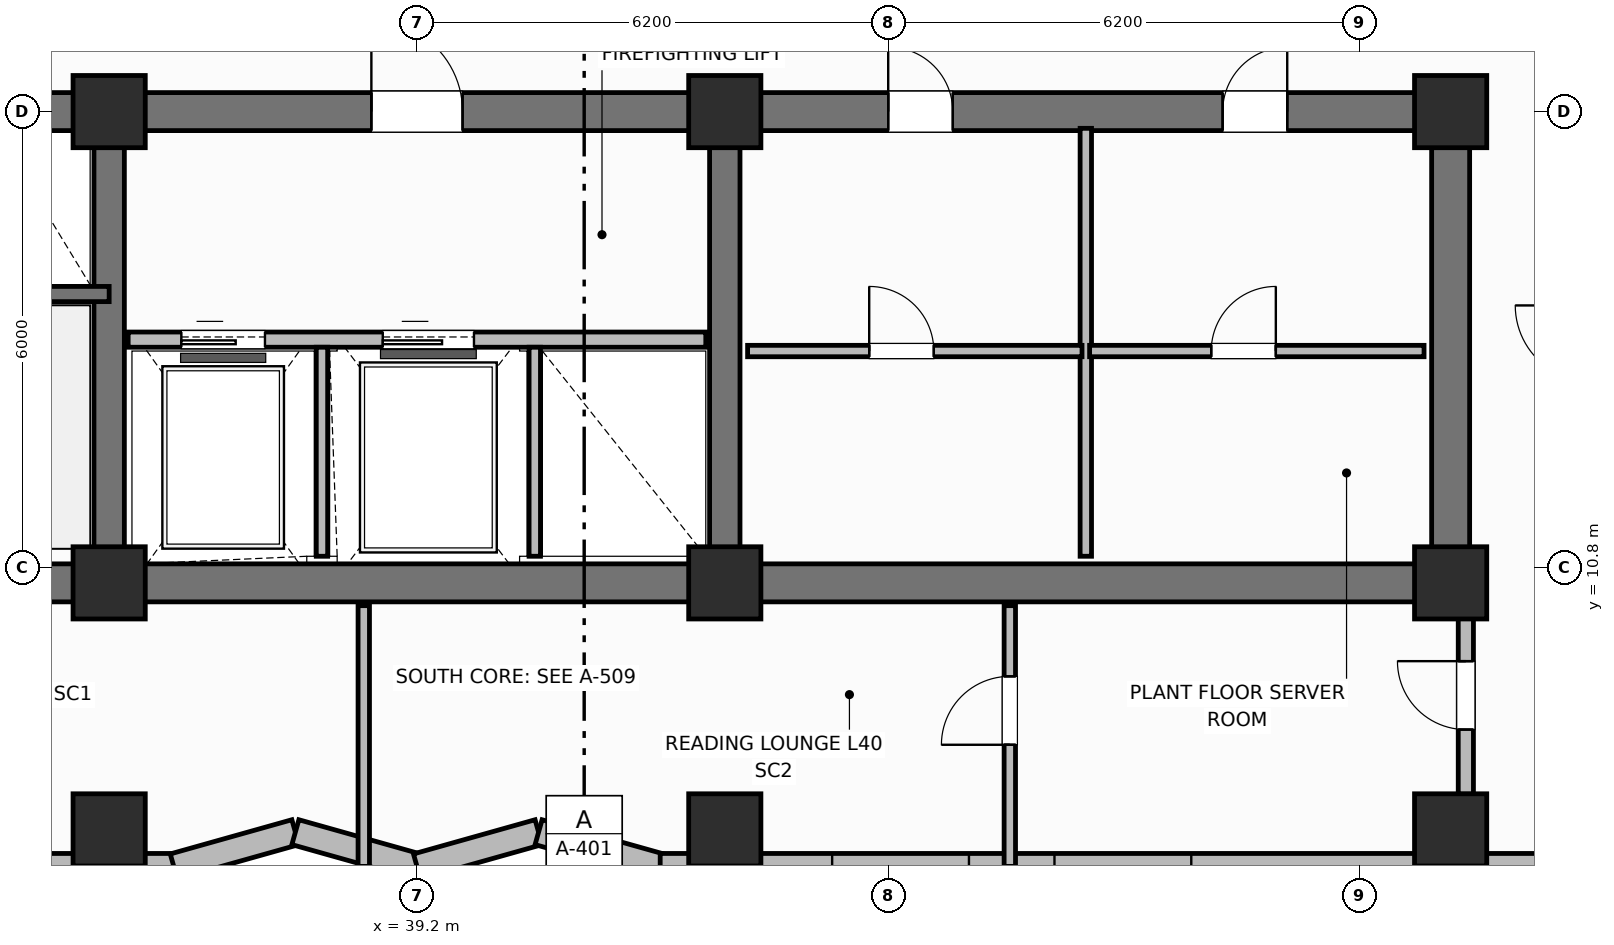
"""IFC4 building model, lengths in metres.
Left out: names, types, materials, properties, quantities, classifications, styles, units other than length and angle.
Written with IfcOpenShell. Run it as: python <this file> out.ifc"""

import sys

from ifc_helpers import new_model, si_unit, direction, frame, frame_2d, origin, origin_2d, place, context, subcontext, project, spatial, rectangle, extrude, element, fill, save


model = new_model("IFC4")
c1 = context("Model", 3, precision=1e-05, world=origin(), true_north=direction((0.0, 1.0)))
c2 = subcontext(c1, "Body", "Model", "MODEL_VIEW")
j1 = project(units=[si_unit("LENGTHUNIT", "METRE"), si_unit("PLANEANGLEUNIT", "RADIAN")], contexts=[c1])
p1 = place(None, origin())
s1 = spatial("IfcSite", under=j1, at=p1, CompositionType="ELEMENT")
p2 = place(p1, origin())
s2 = spatial("IfcBuilding", under=s1, at=p2, CompositionType="ELEMENT")
p3 = place(p2, frame((0.0, 0.0, 162.6)))
s3 = spatial("IfcBuildingStorey", under=s2, at=p3, CompositionType="ELEMENT", Elevation=162.6)
p4 = place(p3, frame((52.8, 10.6, 0.0), z_axis=(0.0, 0.0, 1.0), x_axis=(-1.0, 0.0, 0.0)))
e1 = element("IfcWall", 1, at=p4, inside=s3, PredefinedType="SHEAR", context=c2, shape_type="SweptSolid", body=[
    extrude(rectangle(XDim=27.2, YDim=0.5, at=frame_2d((13.6, 0.0))), origin(), (0.0, 0.0, 1.0), 3.7),
])
p5 = place(p3, frame((52.8, 10.85, 0.0), z_axis=(0.0, 0.0, 1.0), x_axis=(0.0, 1.0, 0.0)))
e2 = element("IfcWall", 2, at=p5, inside=s3, PredefinedType="SHEAR", context=c2, shape_type="SweptSolid", body=[
    extrude(rectangle(XDim=5.7, YDim=0.5, at=frame_2d((2.85, 0.0))), origin(), (0.0, 0.0, 1.0), 3.7),
])
p6 = place(p3, frame((25.6, 16.8, 0.0), z_axis=(0.0, 0.0, 1.0), x_axis=(1.0, 0.0, 0.0)))
e3 = element("IfcWall", 3, at=p6, inside=s3, PredefinedType="SHEAR", context=c2, shape_type="SweptSolid", body=[
    extrude(rectangle(XDim=27.2, YDim=0.5, at=frame_2d((13.6, 0.0))), origin(), (0.0, 0.0, 1.0), 3.7),
])
p7 = place(p6, frame((1.7, 0.0, 0.0)))
e4 = element("IfcOpeningElement", 4, at=p7, cuts=e3, PredefinedType="OPENING", context=c2, shape_type="SweptSolid", body=[
    extrude(rectangle(XDim=1.1, YDim=2.15, at=frame_2d((0.55, 1.075))), frame((0.0, 0.26, 0.0), z_axis=(0.0, -1.0, 0.0), x_axis=(1.0, 0.0, 0.0)), (0.0, 0.0, 1.0), 0.52),
])
p8 = place(p6, frame((4.45, 0.0, 0.0)))
e5 = element("IfcOpeningElement", 5, at=p8, cuts=e3, PredefinedType="OPENING", context=c2, shape_type="SweptSolid", body=[
    extrude(rectangle(XDim=0.85, YDim=2.1, at=frame_2d((0.425, 1.05))), frame((0.0, 0.26, 0.0), z_axis=(0.0, -1.0, 0.0), x_axis=(1.0, 0.0, 0.0)), (0.0, 0.0, 1.0), 0.52),
])
p9 = place(p6, frame((6.5, 0.0, 0.0)))
e6 = element("IfcOpeningElement", 6, at=p9, cuts=e3, PredefinedType="OPENING", context=c2, shape_type="SweptSolid", body=[
    extrude(rectangle(XDim=0.85, YDim=2.1, at=frame_2d((0.425, 1.05))), frame((0.0, 0.26, 0.0), z_axis=(0.0, -1.0, 0.0), x_axis=(1.0, 0.0, 0.0)), (0.0, 0.0, 1.0), 0.52),
])
p10 = place(p6, frame((13.0, 0.0, 0.0)))
e7 = element("IfcOpeningElement", 7, at=p10, cuts=e3, PredefinedType="OPENING", context=c2, shape_type="SweptSolid", body=[
    extrude(rectangle(XDim=1.2, YDim=2.15, at=frame_2d((0.6, 1.075))), frame((0.0, 0.26, 0.0), z_axis=(0.0, -1.0, 0.0), x_axis=(1.0, 0.0, 0.0)), (0.0, 0.0, 1.0), 0.52),
])
p11 = place(p6, frame((19.8, 0.0, 0.0)))
e8 = element("IfcOpeningElement", 8, at=p11, cuts=e3, PredefinedType="OPENING", context=c2, shape_type="SweptSolid", body=[
    extrude(rectangle(XDim=0.85, YDim=2.1, at=frame_2d((0.425, 1.05))), frame((0.0, 0.26, 0.0), z_axis=(0.0, -1.0, 0.0), x_axis=(1.0, 0.0, 0.0)), (0.0, 0.0, 1.0), 0.52),
])
p12 = place(p6, frame((24.2, 0.0, 0.0)))
e9 = element("IfcOpeningElement", 9, at=p12, cuts=e3, PredefinedType="OPENING", context=c2, shape_type="SweptSolid", body=[
    extrude(rectangle(XDim=0.85, YDim=2.1, at=frame_2d((0.425, 1.05))), frame((0.0, 0.26, 0.0), z_axis=(0.0, -1.0, 0.0), x_axis=(1.0, 0.0, 0.0)), (0.0, 0.0, 1.0), 0.52),
])
for number, where, z_axis, x_axis in (
    (10, (35.15, 10.85, 0.0), (0.0, 0.0, 1.0), (0.0, 1.0, 0.0)),
    (11, (43.25, 10.85, 0.0), (0.0, 0.0, 1.0), (0.0, 1.0, 0.0)),
):
    element("IfcWall", number, at=place(p3, frame(where, z_axis=z_axis, x_axis=x_axis)), inside=s3, PredefinedType="SHEAR", context=c2, shape_type="SweptSolid", body=[
        extrude(rectangle(XDim=5.7, YDim=0.4, at=frame_2d((2.85, 0.0))), origin(), (0.0, 0.0, 1.0), 3.7),
    ])
for number, where, z_axis, x_axis in (
    (12, (35.15, 10.6, 0.0), (0.0, 0.0, 1.0), (1.0, 0.0, 0.0)),
    (13, (35.15, 16.8, 0.0), (0.0, 0.0, 1.0), (1.0, 0.0, 0.0)),
    (14, (43.25, 10.6, 0.0), (0.0, 0.0, 1.0), (1.0, 0.0, 0.0)),
    (15, (43.25, 16.8, 0.0), (0.0, 0.0, 1.0), (1.0, 0.0, 0.0)),
    (16, (52.8, 10.6, 0.0), (0.0, 0.0, 1.0), (1.0, 0.0, 0.0)),
    (17, (52.8, 16.8, 0.0), (0.0, 0.0, 1.0), (1.0, 0.0, 0.0)),
    (18, (35.15, 7.35, 0.0), (0.0, 0.0, 1.0), (1.0, 0.0, 0.0)),
    (19, (43.25, 7.35, 0.0), (0.0, 0.0, 1.0), (1.0, 0.0, 0.0)),
    (20, (52.8, 7.35, 0.0), (0.0, 0.0, 1.0), (1.0, 0.0, 0.0)),
):
    element("IfcColumn", number, at=place(p3, frame(where, z_axis=z_axis, x_axis=x_axis)), inside=s3, PredefinedType="COLUMN", context=c2, shape_type="SweptSolid", body=[
        extrude(rectangle(XDim=0.95, YDim=0.95, at=origin_2d()), origin(), (0.0, 0.0, 1.0), 3.7),
    ])
p13 = place(p3, frame((20.2, 6.87, 0.0), z_axis=(0.0, 0.0, 1.0), x_axis=(1.0, 0.0, 0.0)))
e21 = element("IfcWall", 21, at=p13, inside=s3, PredefinedType="SOLIDWALL", context=c2, shape_type="SweptSolid", body=[
    extrude(rectangle(XDim=15.8, YDim=0.34, at=frame_2d((7.9, 0.0))), origin(), (0.0, 0.0, 1.0), 2.72),
])
p14 = place(p13, frame((0.863, 0.0, 0.75)))
e22 = element("IfcOpeningElement", 22, at=p14, cuts=e21, PredefinedType="OPENING", context=c2, shape_type="SweptSolid", body=[
    extrude(rectangle(XDim=1.8, YDim=1.85, at=frame_2d((0.9, 0.925))), frame((0.0, 0.18, 0.0), z_axis=(0.0, -1.0, 0.0), x_axis=(1.0, 0.0, 0.0)), (0.0, 0.0, 1.0), 0.36),
])
p15 = place(p13, frame((8.113, 0.0, 0.75)))
e23 = element("IfcOpeningElement", 23, at=p15, cuts=e21, PredefinedType="OPENING", context=c2, shape_type="SweptSolid", body=[
    extrude(rectangle(XDim=1.8, YDim=1.85, at=frame_2d((0.9, 0.925))), frame((0.0, 0.18, 0.0), z_axis=(0.0, -1.0, 0.0), x_axis=(1.0, 0.0, 0.0)), (0.0, 0.0, 1.0), 0.36),
])
p16 = place(p13, frame((11.738, 0.0, 0.75)))
e24 = element("IfcOpeningElement", 24, at=p16, cuts=e21, PredefinedType="OPENING", context=c2, shape_type="SweptSolid", body=[
    extrude(rectangle(XDim=1.8, YDim=1.85, at=frame_2d((0.9, 0.925))), frame((0.0, 0.18, 0.0), z_axis=(0.0, -1.0, 0.0), x_axis=(1.0, 0.0, 0.0)), (0.0, 0.0, 1.0), 0.36),
])
p17 = place(p3, frame((36.0, 6.87, 0.0), z_axis=(0.0, 0.0, 1.0), x_axis=(0.962662902433, 0.270703040766, 0.0)))
e25 = element("IfcWall", 25, at=p17, inside=s3, PredefinedType="SOLIDWALL", context=c2, shape_type="SweptSolid", body=[
    extrude(rectangle(XDim=1.662, YDim=0.34, at=frame_2d((0.831, 0.0))), origin(), (0.0, 0.0, 1.0), 2.72),
])
p18 = place(p3, frame((37.6, 7.32, 0.0), z_axis=(0.0, 0.0, 1.0), x_axis=(0.962652136636, -0.270741322725, 0.0)))
e26 = element("IfcWall", 26, at=p18, inside=s3, PredefinedType="SOLIDWALL", context=c2, shape_type="SweptSolid", body=[
    extrude(rectangle(XDim=1.662, YDim=0.34, at=frame_2d((0.831, 0.0))), origin(), (0.0, 0.0, 1.0), 2.72),
])
p19 = place(p3, frame((39.2, 6.87, 0.0), z_axis=(0.0, 0.0, 1.0), x_axis=(0.962662902433, 0.270703040766, 0.0)))
e27 = element("IfcWall", 27, at=p19, inside=s3, PredefinedType="SOLIDWALL", context=c2, shape_type="SweptSolid", body=[
    extrude(rectangle(XDim=1.662, YDim=0.34, at=frame_2d((0.831, 0.0))), origin(), (0.0, 0.0, 1.0), 2.72),
])
p20 = place(p3, frame((40.8, 7.32, 0.0), z_axis=(0.0, 0.0, 1.0), x_axis=(0.962652136636, -0.270741322725, 0.0)))
e28 = element("IfcWall", 28, at=p20, inside=s3, PredefinedType="SOLIDWALL", context=c2, shape_type="SweptSolid", body=[
    extrude(rectangle(XDim=1.662, YDim=0.34, at=frame_2d((0.831, 0.0))), origin(), (0.0, 0.0, 1.0), 2.72),
])
p21 = place(p3, frame((42.4, 6.87, 0.0), z_axis=(0.0, 0.0, 1.0), x_axis=(1.0, 0.0, 0.0)))
e29 = element("IfcWall", 29, at=p21, inside=s3, PredefinedType="SOLIDWALL", context=c2, shape_type="SweptSolid", body=[
    extrude(rectangle(XDim=15.8, YDim=0.34, at=frame_2d((7.9, 0.0))), origin(), (0.0, 0.0, 1.0), 2.72),
])
p22 = place(p21, frame((2.262, 0.0, 0.75)))
e30 = element("IfcOpeningElement", 30, at=p22, cuts=e29, PredefinedType="OPENING", context=c2, shape_type="SweptSolid", body=[
    extrude(rectangle(XDim=1.8, YDim=1.85, at=frame_2d((0.9, 0.925))), frame((0.0, 0.18, 0.0), z_axis=(0.0, -1.0, 0.0), x_axis=(1.0, 0.0, 0.0)), (0.0, 0.0, 1.0), 0.36),
])
p23 = place(p21, frame((5.188, 0.0, 0.75)))
e31 = element("IfcOpeningElement", 31, at=p23, cuts=e29, PredefinedType="OPENING", context=c2, shape_type="SweptSolid", body=[
    extrude(rectangle(XDim=1.8, YDim=1.85, at=frame_2d((0.9, 0.925))), frame((0.0, 0.18, 0.0), z_axis=(0.0, -1.0, 0.0), x_axis=(1.0, 0.0, 0.0)), (0.0, 0.0, 1.0), 0.36),
])
p24 = place(p21, frame((12.788, 0.0, 0.75)))
e32 = element("IfcOpeningElement", 32, at=p24, cuts=e29, PredefinedType="OPENING", context=c2, shape_type="SweptSolid", body=[
    extrude(rectangle(XDim=1.8, YDim=1.85, at=frame_2d((0.9, 0.925))), frame((0.0, 0.18, 0.0), z_axis=(0.0, -1.0, 0.0), x_axis=(1.0, 0.0, 0.0)), (0.0, 0.0, 1.0), 0.36),
])
p25 = place(p3, frame((25.6, 14.4, 0.0), z_axis=(0.0, 0.0, 1.0), x_axis=(1.0, 0.0, 0.0)))
e33 = element("IfcWall", 33, at=p25, inside=s3, PredefinedType="SHEAR", context=c2, shape_type="SweptSolid", body=[
    extrude(rectangle(XDim=9.55, YDim=0.2, at=frame_2d((4.775, 0.0))), origin(), (0.0, 0.0, 1.0), 3.7),
])
p26 = place(p25, frame((1.05, 0.0, 0.0)))
e34 = element("IfcOpeningElement", 34, at=p26, cuts=e33, PredefinedType="OPENING", context=c2, shape_type="SweptSolid", body=[
    extrude(rectangle(XDim=1.1, YDim=2.15, at=frame_2d((0.55, 1.075))), frame((0.0, 0.11, 0.0), z_axis=(0.0, -1.0, 0.0), x_axis=(1.0, 0.0, 0.0)), (0.0, 0.0, 1.0), 0.22),
])
p27 = place(p3, frame((35.4, 13.8, 0.0), z_axis=(0.0, 0.0, 1.0), x_axis=(1.0, 0.0, 0.0)))
e35 = element("IfcWall", 35, at=p27, inside=s3, PredefinedType="PARTITIONING", context=c2, shape_type="SweptSolid", body=[
    extrude(rectangle(XDim=7.6, YDim=0.2, at=frame_2d((3.8, 0.0))), origin(), (0.0, 0.0, 1.0), 2.32),
])
p28 = place(p27, frame((0.7, 0.0, 0.0)))
e36 = element("IfcOpeningElement", 36, at=p28, cuts=e35, PredefinedType="OPENING", context=c2, shape_type="SweptSolid", body=[
    extrude(rectangle(XDim=1.1, YDim=2.15, at=frame_2d((0.55, 1.075))), frame((0.0, 0.11, 0.0), z_axis=(0.0, -1.0, 0.0), x_axis=(1.0, 0.0, 0.0)), (0.0, 0.0, 1.0), 0.22),
])
p29 = place(p27, frame((3.35, 0.0, 0.0)))
e37 = element("IfcOpeningElement", 37, at=p29, cuts=e35, PredefinedType="OPENING", context=c2, shape_type="SweptSolid", body=[
    extrude(rectangle(XDim=1.2, YDim=2.15, at=frame_2d((0.6, 1.075))), frame((0.0, 0.11, 0.0), z_axis=(0.0, -1.0, 0.0), x_axis=(1.0, 0.0, 0.0)), (0.0, 0.0, 1.0), 0.22),
])
for number, where, z_axis, x_axis in (
    (38, (37.95, 10.95, 0.0), (0.0, 0.0, 1.0), (0.0, 1.0, 0.0)),
    (39, (40.75, 10.95, 0.0), (0.0, 0.0, 1.0), (0.0, 1.0, 0.0)),
):
    element("IfcWall", number, at=place(p3, frame(where, z_axis=z_axis, x_axis=x_axis)), inside=s3, PredefinedType="PARTITIONING", context=c2, shape_type="SweptSolid", body=[
        extrude(rectangle(XDim=2.75, YDim=0.15, at=frame_2d((1.375, 0.0))), origin(), (0.0, 0.0, 1.0), 2.55),
    ])
p30 = place(p3, frame((48.0, 10.95, 0.0), z_axis=(0.0, 0.0, 1.0), x_axis=(0.0, 1.0, 0.0)))
e40 = element("IfcWall", 40, at=p30, inside=s3, PredefinedType="PARTITIONING", context=c2, shape_type="SweptSolid", body=[
    extrude(rectangle(XDim=5.63, YDim=0.15, at=frame_2d((2.815, 0.0))), origin(), (0.0, 0.0, 1.0), 2.55),
])
p31 = place(p3, frame((43.55, 13.65, 0.0), z_axis=(0.0, 0.0, 1.0), x_axis=(1.0, 0.0, 0.0)))
e41 = element("IfcWall", 41, at=p31, inside=s3, PredefinedType="PARTITIONING", context=c2, shape_type="SweptSolid", body=[
    extrude(rectangle(XDim=4.4, YDim=0.15, at=frame_2d((2.2, 0.0))), origin(), (0.0, 0.0, 1.0), 2.55),
])
p32 = place(p31, frame((1.6, 0.0, 0.0)))
e42 = element("IfcOpeningElement", 42, at=p32, cuts=e41, PredefinedType="OPENING", context=c2, shape_type="SweptSolid", body=[
    extrude(rectangle(XDim=0.85, YDim=2.1, at=frame_2d((0.425, 1.05))), frame((0.0, 0.085, 0.0), z_axis=(0.0, -1.0, 0.0), x_axis=(1.0, 0.0, 0.0)), (0.0, 0.0, 1.0), 0.17),
])
p33 = place(p3, frame((48.05, 13.65, 0.0), z_axis=(0.0, 0.0, 1.0), x_axis=(1.0, 0.0, 0.0)))
e43 = element("IfcWall", 43, at=p33, inside=s3, PredefinedType="PARTITIONING", context=c2, shape_type="SweptSolid", body=[
    extrude(rectangle(XDim=4.4, YDim=0.15, at=frame_2d((2.2, 0.0))), origin(), (0.0, 0.0, 1.0), 2.55),
])
p34 = place(p33, frame((1.6, 0.0, 0.0)))
e44 = element("IfcOpeningElement", 44, at=p34, cuts=e43, PredefinedType="OPENING", context=c2, shape_type="SweptSolid", body=[
    extrude(rectangle(XDim=0.85, YDim=2.1, at=frame_2d((0.425, 1.05))), frame((0.0, 0.085, 0.0), z_axis=(0.0, -1.0, 0.0), x_axis=(1.0, 0.0, 0.0)), (0.0, 0.0, 1.0), 0.17),
])
p35 = place(p3, frame((38.5, 6.87, 0.0), z_axis=(0.0, 0.0, 1.0), x_axis=(0.0, 1.0, 0.0)))
e45 = element("IfcWall", 45, at=p35, inside=s3, PredefinedType="PARTITIONING", context=c2, shape_type="SweptSolid", body=[
    extrude(rectangle(XDim=3.43, YDim=0.15, at=frame_2d((1.715, 0.0))), origin(), (0.0, 0.0, 1.0), 2.55),
])
p36 = place(p3, frame((47.0, 6.87, 0.0), z_axis=(0.0, 0.0, 1.0), x_axis=(0.0, 1.0, 0.0)))
e46 = element("IfcWall", 46, at=p36, inside=s3, PredefinedType="PARTITIONING", context=c2, shape_type="SweptSolid", body=[
    extrude(rectangle(XDim=3.43, YDim=0.15, at=frame_2d((1.715, 0.0))), origin(), (0.0, 0.0, 1.0), 2.55),
])
p37 = place(p36, frame((1.6, 0.0, 0.0)))
e47 = element("IfcOpeningElement", 47, at=p37, cuts=e46, PredefinedType="OPENING", context=c2, shape_type="SweptSolid", body=[
    extrude(rectangle(XDim=0.9, YDim=2.1, at=frame_2d((0.45, 1.05))), frame((0.0, 0.085, 0.0), z_axis=(0.0, -1.0, 0.0), x_axis=(1.0, 0.0, 0.0)), (0.0, 0.0, 1.0), 0.17),
])
p38 = place(p3, frame((53.0, 7.82, 0.0), z_axis=(0.0, 0.0, 1.0), x_axis=(0.0, 1.0, 0.0)))
e48 = element("IfcWall", 48, at=p38, inside=s3, PredefinedType="PARTITIONING", context=c2, shape_type="SweptSolid", body=[
    extrude(rectangle(XDim=2.48, YDim=0.2, at=frame_2d((1.24, 0.0))), origin(), (0.0, 0.0, 1.0), 2.55),
])
p39 = place(p38, frame((0.85, 0.0, 0.0)))
e49 = element("IfcOpeningElement", 49, at=p39, cuts=e48, PredefinedType="OPENING", context=c2, shape_type="SweptSolid", body=[
    extrude(rectangle(XDim=0.9, YDim=2.1, at=frame_2d((0.45, 1.05))), frame((0.0, 0.11, 0.0), z_axis=(0.0, -1.0, 0.0), x_axis=(1.0, 0.0, 0.0)), (0.0, 0.0, 1.0), 0.22),
])
p40 = place(p22, origin())
e50 = element("IfcWindow", 50, at=p40, inside=s3, PartitioningType="SINGLE_PANEL", PredefinedType="WINDOW", context=c2, shape_type="SweptSolid", body=[
    extrude(rectangle(XDim=1.8, YDim=1.85, at=frame_2d((0.9, 0.925))), frame((0.0, 0.03, 0.0), z_axis=(0.0, -1.0, 0.0), x_axis=(1.0, 0.0, 0.0)), (0.0, 0.0, 1.0), 0.06),
])
fill(e30, e50)
p41 = place(p23, origin())
e51 = element("IfcWindow", 51, at=p41, inside=s3, PartitioningType="SINGLE_PANEL", PredefinedType="WINDOW", context=c2, shape_type="SweptSolid", body=[
    extrude(rectangle(XDim=1.8, YDim=1.85, at=frame_2d((0.9, 0.925))), frame((0.0, 0.03, 0.0), z_axis=(0.0, -1.0, 0.0), x_axis=(1.0, 0.0, 0.0)), (0.0, 0.0, 1.0), 0.06),
])
fill(e31, e51)
p42 = place(p28, origin())
e52 = element("IfcDoor", 52, at=p42, inside=s3, OperationType="SLIDING_TO_LEFT", PredefinedType="DOOR", context=c2, shape_type="SweptSolid", body=[
    extrude(rectangle(XDim=1.1, YDim=2.15, at=frame_2d((0.55, 1.075))), frame((0.0, 0.025, 0.0), z_axis=(0.0, -1.0, 0.0), x_axis=(1.0, 0.0, 0.0)), (0.0, 0.0, 1.0), 0.05),
])
fill(e36, e52)
p43 = place(p29, origin())
e53 = element("IfcDoor", 53, at=p43, inside=s3, OperationType="SLIDING_TO_LEFT", PredefinedType="DOOR", context=c2, shape_type="SweptSolid", body=[
    extrude(rectangle(XDim=1.2, YDim=2.15, at=frame_2d((0.6, 1.075))), frame((0.0, 0.025, 0.0), z_axis=(0.0, -1.0, 0.0), x_axis=(1.0, 0.0, 0.0)), (0.0, 0.0, 1.0), 0.05),
])
fill(e37, e53)
p44 = place(p32, origin())
e54 = element("IfcDoor", 54, at=p44, inside=s3, OperationType="SINGLE_SWING_LEFT", PredefinedType="DOOR", context=c2, shape_type="SweptSolid", body=[
    extrude(rectangle(XDim=0.85, YDim=2.1, at=frame_2d((0.425, 1.05))), frame((0.0, 0.025, 0.0), z_axis=(0.0, -1.0, 0.0), x_axis=(1.0, 0.0, 0.0)), (0.0, 0.0, 1.0), 0.05),
])
fill(e42, e54)
p45 = place(p34, origin())
e55 = element("IfcDoor", 55, at=p45, inside=s3, OperationType="SINGLE_SWING_RIGHT", PredefinedType="DOOR", context=c2, shape_type="SweptSolid", body=[
    extrude(rectangle(XDim=0.85, YDim=2.1, at=frame_2d((0.425, 1.05))), frame((0.0, 0.025, 0.0), z_axis=(0.0, -1.0, 0.0), x_axis=(1.0, 0.0, 0.0)), (0.0, 0.0, 1.0), 0.05),
])
fill(e44, e55)
p46 = place(p37, origin())
e56 = element("IfcDoor", 56, at=p46, inside=s3, OperationType="SINGLE_SWING_LEFT", PredefinedType="DOOR", context=c2, shape_type="SweptSolid", body=[
    extrude(rectangle(XDim=0.9, YDim=2.1, at=frame_2d((0.45, 1.05))), frame((0.0, 0.025, 0.0), z_axis=(0.0, -1.0, 0.0), x_axis=(1.0, 0.0, 0.0)), (0.0, 0.0, 1.0), 0.05),
])
fill(e47, e56)
p47 = place(p39, origin())
e57 = element("IfcDoor", 57, at=p47, inside=s3, OperationType="SINGLE_SWING_RIGHT", PredefinedType="DOOR", context=c2, shape_type="SweptSolid", body=[
    extrude(rectangle(XDim=0.9, YDim=2.1, at=frame_2d((0.45, 1.05))), frame((0.0, 0.025, 0.0), z_axis=(0.0, -1.0, 0.0), x_axis=(1.0, 0.0, 0.0)), (0.0, 0.0, 1.0), 0.05),
])
fill(e49, e57)
p48 = place(p10, origin())
e58 = element("IfcDoor", 58, at=p48, inside=s3, OperationType="SINGLE_SWING_LEFT", PredefinedType="DOOR", context=c2, shape_type="SweptSolid", body=[
    extrude(rectangle(XDim=1.2, YDim=2.15, at=frame_2d((0.6, 1.075))), frame((0.0, 0.025, 0.0), z_axis=(0.0, -1.0, 0.0), x_axis=(1.0, 0.0, 0.0)), (0.0, 0.0, 1.0), 0.05),
])
fill(e7, e58)
p49 = place(p11, origin())
e59 = element("IfcDoor", 59, at=p49, inside=s3, OperationType="SINGLE_SWING_LEFT", PredefinedType="DOOR", context=c2, shape_type="SweptSolid", body=[
    extrude(rectangle(XDim=0.85, YDim=2.1, at=frame_2d((0.425, 1.05))), frame((0.0, 0.025, 0.0), z_axis=(0.0, -1.0, 0.0), x_axis=(1.0, 0.0, 0.0)), (0.0, 0.0, 1.0), 0.05),
])
fill(e8, e59)
p50 = place(p12, origin())
e60 = element("IfcDoor", 60, at=p50, inside=s3, OperationType="SINGLE_SWING_RIGHT", PredefinedType="DOOR", context=c2, shape_type="SweptSolid", body=[
    extrude(rectangle(XDim=0.85, YDim=2.1, at=frame_2d((0.425, 1.05))), frame((0.0, 0.025, 0.0), z_axis=(0.0, -1.0, 0.0), x_axis=(1.0, 0.0, 0.0)), (0.0, 0.0, 1.0), 0.05),
])
fill(e9, e60)
save(model, sys.argv[1])
